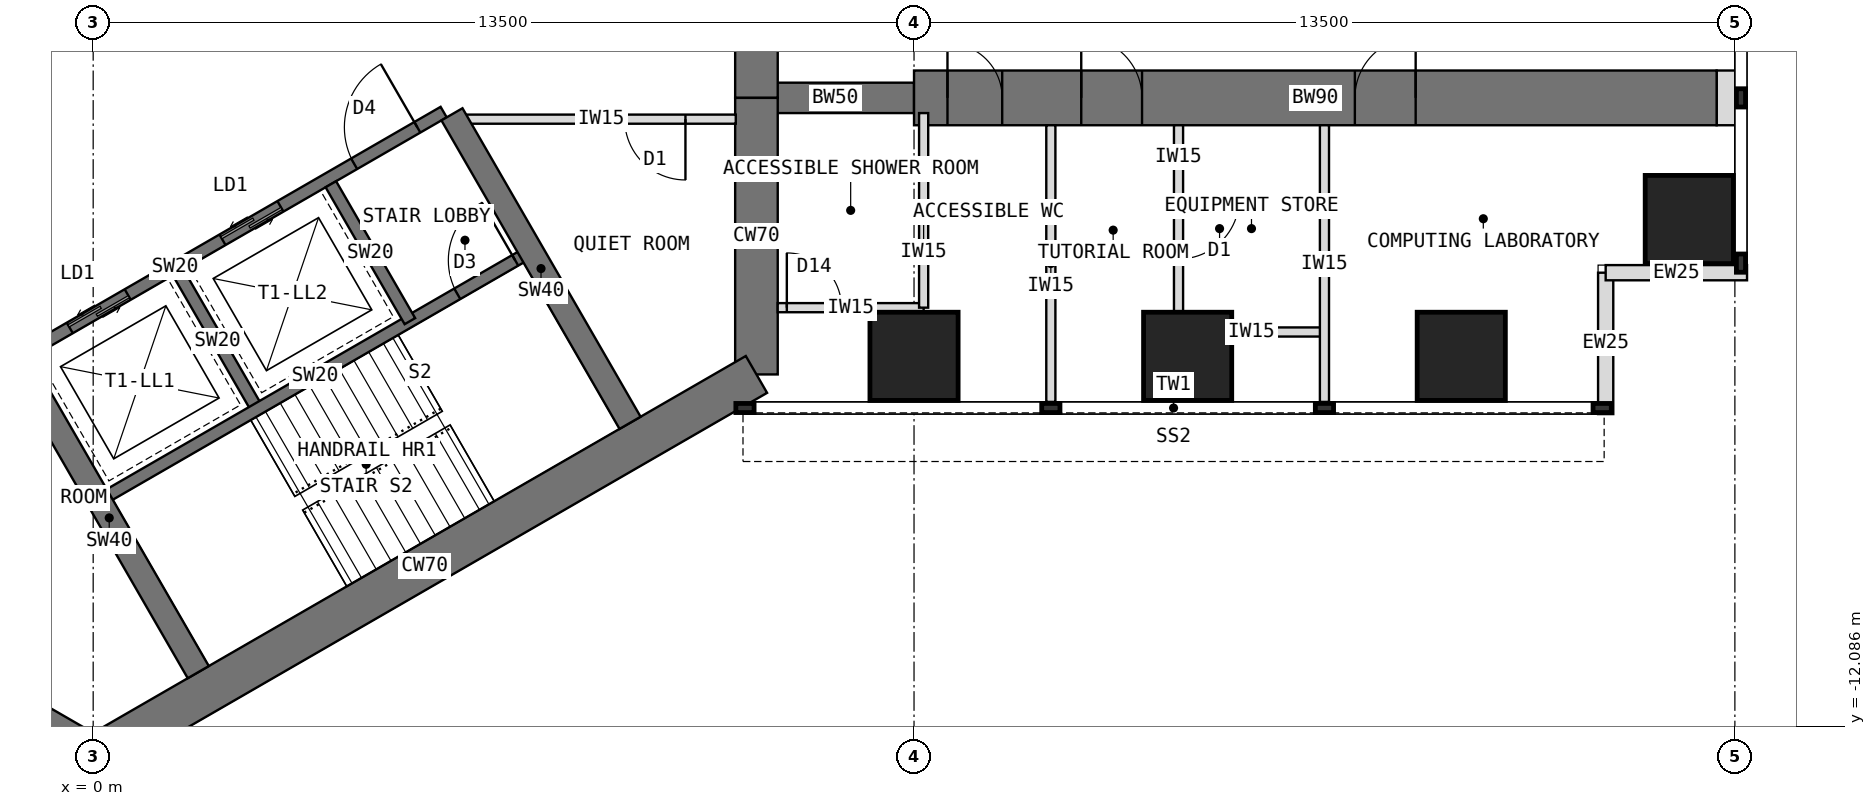
"""IFC4 building model, lengths in metres.
Left out: names, types, materials, properties, quantities, classifications, styles, units other than length and angle.
Written with IfcOpenShell. Run it as: python <this file> out.ifc"""

import sys

from ifc_helpers import new_model, si_unit, direction, frame, frame_2d, origin, origin_2d, place, context, subcontext, project, spatial, rectangle, extrude, element, fill, save


model = new_model("IFC4")
c1 = context("Model", 3, precision=1e-05, world=origin(), true_north=direction((0.0, 1.0)))
c2 = subcontext(c1, "Body", "Model", "MODEL_VIEW")
j1 = project(units=[si_unit("LENGTHUNIT", "METRE"), si_unit("PLANEANGLEUNIT", "RADIAN")], contexts=[c1])
p1 = place(None, origin())
s1 = spatial("IfcSite", under=j1, at=p1, CompositionType="ELEMENT")
p2 = place(p1, origin())
s2 = spatial("IfcBuilding", under=s1, at=p2, CompositionType="ELEMENT")
p3 = place(p2, frame((0.0, 0.0, 60.5)))
s3 = spatial("IfcBuildingStorey", under=s2, at=p3, CompositionType="ELEMENT", Elevation=60.5)
p4 = place(p3, frame((10.908, -6.298, 0.0), z_axis=(0.0, 0.0, 1.0), x_axis=(0.0, 1.0, 0.0)))
e1 = element("IfcWall", 1, at=p4, inside=s3, PredefinedType="SHEAR", context=c2, shape_type="SweptSolid", body=[
    extrude(rectangle(XDim=4.548, YDim=0.7, at=frame_2d((2.274, 0.0))), origin(), (0.0, 0.0, 1.0), 4.0),
])
p5 = place(p3, frame((10.908, -1.75, 0.0), z_axis=(0.0, 0.0, 1.0), x_axis=(0.0, 1.0, 0.0)))
e2 = element("IfcWall", 2, at=p5, inside=s3, PredefinedType="SHEAR", context=c2, shape_type="SweptSolid", body=[
    extrude(rectangle(XDim=3.5, YDim=0.7, at=frame_2d((1.75, 0.0))), origin(), (0.0, 0.0, 1.0), 4.0),
])
p6 = place(p5, frame((0.85, 0.0, 0.0)))
e3 = element("IfcOpeningElement", 3, at=p6, cuts=e2, PredefinedType="OPENING", context=c2, shape_type="SweptSolid", body=[
    extrude(rectangle(XDim=1.8, YDim=2.1, at=frame_2d((0.9, 1.05))), frame((0.0, 0.36, 0.0), z_axis=(0.0, -1.0, 0.0), x_axis=(1.0, 0.0, 0.0)), (0.0, 0.0, 1.0), 0.72),
])
p7 = place(p3, frame((-3.939, -10.322, 0.0), z_axis=(0.0, 0.0, 1.0), x_axis=(0.866011268655, -0.500024481964, 0.0)))
e4 = element("IfcWall", 4, at=p7, inside=s3, PredefinedType="SHEAR", context=c2, shape_type="SweptSolid", body=[
    extrude(rectangle(XDim=4.548, YDim=0.7, at=frame_2d((2.274, 0.0))), origin(), (0.0, 0.0, 1.0), 4.0),
])
p8 = place(p3, frame((0.0, -12.596, 0.0), z_axis=(0.0, 0.0, 1.0), x_axis=(0.866021940709, 0.500005998175, 0.0)))
e5 = element("IfcWall", 5, at=p8, inside=s3, PredefinedType="SHEAR", context=c2, shape_type="SweptSolid", body=[
    extrude(rectangle(XDim=12.596, YDim=0.7, at=frame_2d((6.298, 0.0))), origin(), (0.0, 0.0, 1.0), 4.0),
])
p9 = place(p3, frame((10.908, -1.75, 0.0), z_axis=(0.0, 0.0, 1.0), x_axis=(1.0, 0.0, 0.0)))
e6 = element("IfcWall", 6, at=p9, inside=s3, PredefinedType="SHEAR", context=c2, shape_type="SweptSolid", body=[
    extrude(rectangle(XDim=2.592, YDim=0.5, at=frame_2d((1.296, 0.0))), origin(), (0.0, 0.0, 1.0), 4.0),
])
p10 = place(p3, frame((13.5, -1.75, 0.0), z_axis=(0.0, 0.0, 1.0), x_axis=(1.0, 0.0, 0.0)))
e7 = element("IfcWall", 7, at=p10, inside=s3, PredefinedType="SHEAR", context=c2, shape_type="SweptSolid", body=[
    extrude(rectangle(XDim=13.2, YDim=0.9, at=frame_2d((6.6, 0.0))), origin(), (0.0, 0.0, 1.0), 4.0),
])
p11 = place(p10, frame((0.55, 0.0, 0.0)))
e8 = element("IfcOpeningElement", 8, at=p11, cuts=e7, PredefinedType="OPENING", context=c2, shape_type="SweptSolid", body=[
    extrude(rectangle(XDim=0.9, YDim=2.1, at=frame_2d((0.45, 1.05))), frame((0.0, 0.46, 0.0), z_axis=(0.0, -1.0, 0.0), x_axis=(1.0, 0.0, 0.0)), (0.0, 0.0, 1.0), 0.92),
])
p12 = place(p10, frame((2.75, 0.0, 0.0)))
e9 = element("IfcOpeningElement", 9, at=p12, cuts=e7, PredefinedType="OPENING", context=c2, shape_type="SweptSolid", body=[
    extrude(rectangle(XDim=1.0, YDim=2.1, at=frame_2d((0.5, 1.05))), frame((0.0, 0.46, 0.0), z_axis=(0.0, -1.0, 0.0), x_axis=(1.0, 0.0, 0.0)), (0.0, 0.0, 1.0), 0.92),
])
p13 = place(p10, frame((7.25, 0.0, 0.0)))
e10 = element("IfcOpeningElement", 10, at=p13, cuts=e7, PredefinedType="OPENING", context=c2, shape_type="SweptSolid", body=[
    extrude(rectangle(XDim=1.0, YDim=2.1, at=frame_2d((0.5, 1.05))), frame((0.0, 0.46, 0.0), z_axis=(0.0, -1.0, 0.0), x_axis=(1.0, 0.0, 0.0)), (0.0, 0.0, 1.0), 0.92),
])
for number, where, z_axis, x_axis in (
    (11, (13.5, -6.0, 0.0), (0.0, 0.0, 1.0), (1.0, 0.0, 0.0)),
    (12, (18.0, -6.0, 0.0), (0.0, 0.0, 1.0), (1.0, 0.0, 0.0)),
    (13, (22.5, -6.0, 0.0), (0.0, 0.0, 1.0), (1.0, 0.0, 0.0)),
    (14, (26.25, -3.75, 0.0), (0.0, 0.0, 1.0), (1.0, 0.0, 0.0)),
):
    element("IfcColumn", number, at=place(p3, frame(where, z_axis=z_axis, x_axis=x_axis)), inside=s3, PredefinedType="COLUMN", context=c2, shape_type="SweptSolid", body=[
        extrude(rectangle(XDim=1.45, YDim=1.45, at=origin_2d()), origin(), (0.0, 0.0, 1.0), 4.0),
    ])
for number, where, z_axis, x_axis in (
    (15, (24.875, -6.95, 0.0), (0.0, 0.0, 1.0), (0.0, 1.0, 0.0)),
    (16, (24.875, -4.625, 0.0), (0.0, 0.0, 1.0), (1.0, 0.0, 0.0)),
):
    element("IfcWall", number, at=place(p3, frame(where, z_axis=z_axis, x_axis=x_axis)), inside=s3, PredefinedType="STANDARD", context=c2, shape_type="SweptSolid", body=[
        extrude(rectangle(XDim=2.325, YDim=0.25, at=frame_2d((1.163, 0.0))), origin(), (0.0, 0.0, 1.0), 3.8),
    ])
p14 = place(p3, frame((26.7, -1.75, 0.0), z_axis=(0.0, 0.0, 1.0), x_axis=(1.0, 0.0, 0.0)))
e17 = element("IfcWall", 17, at=p14, inside=s3, PredefinedType="PARTITIONING", context=c2, shape_type="SweptSolid", body=[
    extrude(rectangle(XDim=0.31, YDim=0.9, at=frame_2d((0.155, 0.0))), origin(), (0.0, 0.0, 1.0), 3.8),
])
p15 = place(p3, frame((-1.164, -5.984, 0.0), z_axis=(0.0, 0.0, 1.0), x_axis=(0.866026010844, 0.49999894854, 0.0)))
e18 = element("IfcWall", 18, at=p15, inside=s3, PredefinedType="SHEAR", context=c2, shape_type="SweptSolid", body=[
    extrude(rectangle(XDim=8.0, YDim=0.2, at=frame_2d((4.0, 0.0))), origin(), (0.0, 0.0, 1.0), 4.0),
])
p16 = place(p15, frame((6.3, 0.0, 0.0)))
e19 = element("IfcOpeningElement", 19, at=p16, cuts=e18, PredefinedType="OPENING", context=c2, shape_type="SweptSolid", body=[
    extrude(rectangle(XDim=1.2, YDim=2.1, at=frame_2d((0.6, 1.05))), frame((0.0, 0.11, 0.0), z_axis=(0.0, -1.0, 0.0), x_axis=(1.0, 0.0, 0.0)), (0.0, 0.0, 1.0), 0.22),
])
p17 = place(p15, frame((0.9, 0.0, 0.0)))
e20 = element("IfcOpeningElement", 20, at=p17, cuts=e18, PredefinedType="OPENING", context=c2, shape_type="SweptSolid", body=[
    extrude(rectangle(XDim=1.1, YDim=2.2, at=frame_2d((0.55, 1.1))), frame((0.0, 0.11, 0.0), z_axis=(0.0, -1.0, 0.0), x_axis=(1.0, 0.0, 0.0)), (0.0, 0.0, 1.0), 0.22),
])
p18 = place(p15, frame((3.8, 0.0, 0.0)))
e21 = element("IfcOpeningElement", 21, at=p18, cuts=e18, PredefinedType="OPENING", context=c2, shape_type="SweptSolid", body=[
    extrude(rectangle(XDim=1.1, YDim=2.2, at=frame_2d((0.55, 1.1))), frame((0.0, 0.11, 0.0), z_axis=(0.0, -1.0, 0.0), x_axis=(1.0, 0.0, 0.0)), (0.0, 0.0, 1.0), 0.22),
])
p19 = place(p3, frame((1.397, -4.62, 0.0), z_axis=(0.0, 0.0, 1.0), x_axis=(0.499936506574, -0.866062058628, 0.0)))
e22 = element("IfcWall", 22, at=p19, inside=s3, PredefinedType="SHEAR", context=c2, shape_type="SweptSolid", body=[
    extrude(rectangle(XDim=2.6, YDim=0.2, at=frame_2d((1.3, 0.0))), origin(), (0.0, 0.0, 1.0), 4.0),
])
p20 = place(p3, frame((3.909, -3.17, 0.0), z_axis=(0.0, 0.0, 1.0), x_axis=(0.49997716683, -0.86603858612, 0.0)))
e23 = element("IfcWall", 23, at=p20, inside=s3, PredefinedType="SHEAR", context=c2, shape_type="SweptSolid", body=[
    extrude(rectangle(XDim=2.6, YDim=0.2, at=frame_2d((1.3, 0.0))), origin(), (0.0, 0.0, 1.0), 4.0),
])
p21 = place(p3, frame((0.186, -8.322, 0.0), z_axis=(0.0, 0.0, 1.0), x_axis=(0.866026010844, 0.49999894854, 0.0)))
e24 = element("IfcWall", 24, at=p21, inside=s3, PredefinedType="SHEAR", context=c2, shape_type="SweptSolid", body=[
    extrude(rectangle(XDim=8.0, YDim=0.2, at=frame_2d((4.0, 0.0))), origin(), (0.0, 0.0, 1.0), 4.0),
])
p22 = place(p21, frame((6.7, 0.0, 0.0)))
e25 = element("IfcOpeningElement", 25, at=p22, cuts=e24, PredefinedType="OPENING", context=c2, shape_type="SweptSolid", body=[
    extrude(rectangle(XDim=1.1, YDim=2.1, at=frame_2d((0.55, 1.05))), frame((0.0, 0.11, 0.0), z_axis=(0.0, -1.0, 0.0), x_axis=(1.0, 0.0, 0.0)), (0.0, 0.0, 1.0), 0.22),
])
for number, where, z_axis, x_axis in (
    (26, (5.901, -2.02, 0.0), (0.0, 0.0, 1.0), (0.5, -0.866, 0.0)),
    (27, (-1.201, -6.12, 0.0), (0.0, 0.0, 1.0), (0.5, -0.866, 0.0)),
):
    element("IfcWall", number, at=place(p3, frame(where, z_axis=z_axis, x_axis=x_axis)), inside=s3, PredefinedType="SHEAR", context=c2, shape_type="SweptSolid", body=[
        extrude(rectangle(XDim=5.858, YDim=0.4, at=frame_2d((2.929, 0.0))), origin(), (0.0, 0.0, 1.0), 4.0),
    ])
for number, where, z_axis, x_axis in (
    (28, (15.75, -2.2, 0.0), (0.0, 0.0, 1.0), (0.0, -1.0, 0.0)),
    (29, (20.25, -2.2, 0.0), (0.0, 0.0, 1.0), (0.0, -1.0, 0.0)),
):
    element("IfcWall", number, at=place(p3, frame(where, z_axis=z_axis, x_axis=x_axis)), inside=s3, PredefinedType="PARTITIONING", context=c2, shape_type="SweptSolid", body=[
        extrude(rectangle(XDim=4.55, YDim=0.15, at=frame_2d((2.275, 0.0))), origin(), (0.0, 0.0, 1.0), 3.8),
    ])
p23 = place(p3, frame((17.85, -5.6, 0.0), z_axis=(0.0, 0.0, 1.0), x_axis=(1.0, 0.0, 0.0)))
e30 = element("IfcWall", 30, at=p23, inside=s3, PredefinedType="PARTITIONING", context=c2, shape_type="SweptSolid", body=[
    extrude(rectangle(XDim=2.4, YDim=0.15, at=frame_2d((1.2, 0.0))), origin(), (0.0, 0.0, 1.0), 3.8),
])
p24 = place(p3, frame((17.85, -2.2, 0.0), z_axis=(0.0, 0.0, 1.0), x_axis=(0.0, -1.0, 0.0)))
e31 = element("IfcWall", 31, at=p24, inside=s3, PredefinedType="PARTITIONING", context=c2, shape_type="SweptSolid", body=[
    extrude(rectangle(XDim=3.4, YDim=0.15, at=frame_2d((1.7, 0.0))), origin(), (0.0, 0.0, 1.0), 3.8),
])
p25 = place(p24, frame((1.2, 0.0, 0.0)))
e32 = element("IfcOpeningElement", 32, at=p25, cuts=e31, PredefinedType="OPENING", context=c2, shape_type="SweptSolid", body=[
    extrude(rectangle(XDim=1.0, YDim=2.1, at=frame_2d((0.5, 1.05))), frame((0.0, 0.085, 0.0), z_axis=(0.0, -1.0, 0.0), x_axis=(1.0, 0.0, 0.0)), (0.0, 0.0, 1.0), 0.17),
])
p26 = place(p3, frame((11.258, -5.2, 0.0), z_axis=(0.0, 0.0, 1.0), x_axis=(1.0, 0.0, 0.0)))
e33 = element("IfcWall", 33, at=p26, inside=s3, PredefinedType="PARTITIONING", context=c2, shape_type="SweptSolid", body=[
    extrude(rectangle(XDim=2.4, YDim=0.15, at=frame_2d((1.2, 0.0))), origin(), (0.0, 0.0, 1.0), 3.8),
])
p27 = place(p26, frame((0.15, 0.0, 0.0)))
e34 = element("IfcOpeningElement", 34, at=p27, cuts=e33, PredefinedType="OPENING", context=c2, shape_type="SweptSolid", body=[
    extrude(rectangle(XDim=0.9, YDim=2.1, at=frame_2d((0.45, 1.05))), frame((0.0, 0.085, 0.0), z_axis=(0.0, -1.0, 0.0), x_axis=(1.0, 0.0, 0.0)), (0.0, 0.0, 1.0), 0.17),
])
p28 = place(p3, frame((13.658, -2.0, 0.0), z_axis=(0.0, 0.0, 1.0), x_axis=(0.0, -1.0, 0.0)))
e35 = element("IfcWall", 35, at=p28, inside=s3, PredefinedType="PARTITIONING", context=c2, shape_type="SweptSolid", body=[
    extrude(rectangle(XDim=3.2, YDim=0.15, at=frame_2d((1.6, 0.0))), origin(), (0.0, 0.0, 1.0), 3.8),
])
p29 = place(p3, frame((10.568, -2.1, 0.0), z_axis=(0.0, 0.0, 1.0), x_axis=(-1.0, 0.0, 0.0)))
e36 = element("IfcWall", 36, at=p29, inside=s3, PredefinedType="PARTITIONING", context=c2, shape_type="SweptSolid", body=[
    extrude(rectangle(XDim=4.426, YDim=0.15, at=frame_2d((2.213, 0.0))), origin(), (0.0, 0.0, 1.0), 3.8),
])
p30 = place(p29, frame((0.828, 0.0, 0.0)))
e37 = element("IfcOpeningElement", 37, at=p30, cuts=e36, PredefinedType="OPENING", context=c2, shape_type="SweptSolid", body=[
    extrude(rectangle(XDim=1.0, YDim=2.1, at=frame_2d((0.5, 1.05))), frame((0.0, 0.085, 0.0), z_axis=(0.0, -1.0, 0.0), x_axis=(1.0, 0.0, 0.0)), (0.0, 0.0, 1.0), 0.17),
])
p31 = place(p16, origin())
e38 = element("IfcDoor", 38, at=p31, inside=s3, OperationType="SINGLE_SWING_RIGHT", PredefinedType="DOOR", context=c2, shape_type="SweptSolid", body=[
    extrude(rectangle(XDim=1.2, YDim=2.1, at=frame_2d((0.6, 1.05))), frame((0.0, 0.025, 0.0), z_axis=(0.0, -1.0, 0.0), x_axis=(1.0, 0.0, 0.0)), (0.0, 0.0, 1.0), 0.05),
])
fill(e19, e38)
p32 = place(p17, origin())
e39 = element("IfcDoor", 39, at=p32, inside=s3, OperationType="DOUBLE_DOOR_SLIDING", PredefinedType="DOOR", context=c2, shape_type="SweptSolid", body=[
    extrude(rectangle(XDim=1.1, YDim=2.2, at=frame_2d((0.55, 1.1))), frame((0.0, 0.025, 0.0), z_axis=(0.0, -1.0, 0.0), x_axis=(1.0, 0.0, 0.0)), (0.0, 0.0, 1.0), 0.05),
])
fill(e20, e39)
p33 = place(p18, origin())
e40 = element("IfcDoor", 40, at=p33, inside=s3, OperationType="DOUBLE_DOOR_SLIDING", PredefinedType="DOOR", context=c2, shape_type="SweptSolid", body=[
    extrude(rectangle(XDim=1.1, YDim=2.2, at=frame_2d((0.55, 1.1))), frame((0.0, 0.025, 0.0), z_axis=(0.0, -1.0, 0.0), x_axis=(1.0, 0.0, 0.0)), (0.0, 0.0, 1.0), 0.05),
])
fill(e21, e40)
p34 = place(p22, origin())
e41 = element("IfcDoor", 41, at=p34, inside=s3, OperationType="SINGLE_SWING_RIGHT", PredefinedType="DOOR", context=c2, shape_type="SweptSolid", body=[
    extrude(rectangle(XDim=1.1, YDim=2.1, at=frame_2d((0.55, 1.05))), frame((0.0, 0.025, 0.0), z_axis=(0.0, -1.0, 0.0), x_axis=(1.0, 0.0, 0.0)), (0.0, 0.0, 1.0), 0.05),
])
fill(e25, e41)
p35 = place(p25, origin())
e42 = element("IfcDoor", 42, at=p35, inside=s3, OperationType="SINGLE_SWING_LEFT", PredefinedType="DOOR", context=c2, shape_type="SweptSolid", body=[
    extrude(rectangle(XDim=1.0, YDim=2.1, at=frame_2d((0.5, 1.05))), frame((0.0, 0.025, 0.0), z_axis=(0.0, -1.0, 0.0), x_axis=(1.0, 0.0, 0.0)), (0.0, 0.0, 1.0), 0.05),
])
fill(e32, e42)
p36 = place(p27, origin())
e43 = element("IfcDoor", 43, at=p36, inside=s3, OperationType="SINGLE_SWING_LEFT", PredefinedType="DOOR", context=c2, shape_type="SweptSolid", body=[
    extrude(rectangle(XDim=0.9, YDim=2.1, at=frame_2d((0.45, 1.05))), frame((0.0, 0.025, 0.0), z_axis=(0.0, -1.0, 0.0), x_axis=(1.0, 0.0, 0.0)), (0.0, 0.0, 1.0), 0.05),
])
fill(e34, e43)
p37 = place(p30, origin())
e44 = element("IfcDoor", 44, at=p37, inside=s3, OperationType="SINGLE_SWING_LEFT", PredefinedType="DOOR", context=c2, shape_type="SweptSolid", body=[
    extrude(rectangle(XDim=1.0, YDim=2.1, at=frame_2d((0.5, 1.05))), frame((0.0, 0.025, 0.0), z_axis=(0.0, -1.0, 0.0), x_axis=(1.0, 0.0, 0.0)), (0.0, 0.0, 1.0), 0.05),
])
fill(e37, e44)
p38 = place(p11, origin())
e45 = element("IfcDoor", 45, at=p38, inside=s3, OperationType="SINGLE_SWING_LEFT", PredefinedType="DOOR", context=c2, shape_type="SweptSolid", body=[
    extrude(rectangle(XDim=0.82, YDim=2.06, at=frame_2d((0.45, 1.03))), frame((0.0, 0.025, 0.0), z_axis=(0.0, -1.0, 0.0), x_axis=(1.0, 0.0, 0.0)), (0.0, 0.0, 1.0), 0.05),
    extrude(rectangle(XDim=0.04, YDim=2.1, at=frame_2d((0.02, 1.05))), frame((0.0, 0.45, 0.0), z_axis=(0.0, -1.0, 0.0), x_axis=(1.0, 0.0, 0.0)), (0.0, 0.0, 1.0), 0.899),
    extrude(rectangle(XDim=0.04, YDim=2.1, at=frame_2d((0.88, 1.05))), frame((0.0, 0.45, 0.0), z_axis=(0.0, -1.0, 0.0), x_axis=(1.0, 0.0, 0.0)), (0.0, 0.0, 1.0), 0.899),
    extrude(rectangle(XDim=0.82, YDim=0.04, at=frame_2d((0.45, 2.08))), frame((0.0, 0.45, 0.0), z_axis=(0.0, -1.0, 0.0), x_axis=(1.0, 0.0, 0.0)), (0.0, 0.0, 1.0), 0.899),
])
fill(e8, e45)
p39 = place(p12, origin())
e46 = element("IfcDoor", 46, at=p39, inside=s3, OperationType="SINGLE_SWING_LEFT", PredefinedType="DOOR", context=c2, shape_type="SweptSolid", body=[
    extrude(rectangle(XDim=0.92, YDim=2.06, at=frame_2d((0.5, 1.03))), frame((0.0, 0.025, 0.0), z_axis=(0.0, -1.0, 0.0), x_axis=(1.0, 0.0, 0.0)), (0.0, 0.0, 1.0), 0.05),
    extrude(rectangle(XDim=0.04, YDim=2.1, at=frame_2d((0.02, 1.05))), frame((0.0, 0.45, 0.0), z_axis=(0.0, -1.0, 0.0), x_axis=(1.0, 0.0, 0.0)), (0.0, 0.0, 1.0), 0.899),
    extrude(rectangle(XDim=0.04, YDim=2.1, at=frame_2d((0.98, 1.05))), frame((0.0, 0.45, 0.0), z_axis=(0.0, -1.0, 0.0), x_axis=(1.0, 0.0, 0.0)), (0.0, 0.0, 1.0), 0.899),
    extrude(rectangle(XDim=0.92, YDim=0.04, at=frame_2d((0.5, 2.08))), frame((0.0, 0.45, 0.0), z_axis=(0.0, -1.0, 0.0), x_axis=(1.0, 0.0, 0.0)), (0.0, 0.0, 1.0), 0.899),
])
fill(e9, e46)
p40 = place(p13, origin())
e47 = element("IfcDoor", 47, at=p40, inside=s3, OperationType="SINGLE_SWING_RIGHT", PredefinedType="DOOR", context=c2, shape_type="SweptSolid", body=[
    extrude(rectangle(XDim=0.92, YDim=2.06, at=frame_2d((0.5, 1.03))), frame((0.0, 0.025, 0.0), z_axis=(0.0, -1.0, 0.0), x_axis=(1.0, 0.0, 0.0)), (0.0, 0.0, 1.0), 0.05),
    extrude(rectangle(XDim=0.04, YDim=2.1, at=frame_2d((0.02, 1.05))), frame((0.0, 0.45, 0.0), z_axis=(0.0, -1.0, 0.0), x_axis=(1.0, 0.0, 0.0)), (0.0, 0.0, 1.0), 0.899),
    extrude(rectangle(XDim=0.04, YDim=2.1, at=frame_2d((0.98, 1.05))), frame((0.0, 0.45, 0.0), z_axis=(0.0, -1.0, 0.0), x_axis=(1.0, 0.0, 0.0)), (0.0, 0.0, 1.0), 0.899),
    extrude(rectangle(XDim=0.92, YDim=0.04, at=frame_2d((0.5, 2.08))), frame((0.0, 0.45, 0.0), z_axis=(0.0, -1.0, 0.0), x_axis=(1.0, 0.0, 0.0)), (0.0, 0.0, 1.0), 0.899),
])
fill(e10, e47)
save(model, sys.argv[1])
